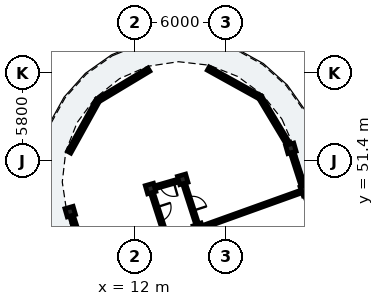
"""IFC4 building model, lengths in metres.
Left out: names, types, materials, properties, quantities, classifications, styles, units other than length and angle.
Written with IfcOpenShell. Run it as: python <this file> out.ifc"""

import sys

from ifc_helpers import new_model, si_unit, direction, frame, frame_2d, origin, origin_2d, place, context, subcontext, project, spatial, rectangle, extrude, element, fill, save


model = new_model("IFC4")
c1 = context("Model", 3, precision=1e-05, world=origin(), true_north=direction((0.0, 1.0)))
c2 = subcontext(c1, "Body", "Model", "MODEL_VIEW")
j1 = project(units=[si_unit("LENGTHUNIT", "METRE"), si_unit("PLANEANGLEUNIT", "RADIAN")], contexts=[c1])
p1 = place(None, origin())
s1 = spatial("IfcSite", under=j1, at=p1, CompositionType="ELEMENT")
p2 = place(p1, origin())
s2 = spatial("IfcBuilding", under=s1, at=p2, CompositionType="ELEMENT")
p3 = place(p2, frame((0.0, 0.0, 15.56)))
s3 = spatial("IfcBuildingStorey", under=s2, at=p3, CompositionType="ELEMENT", Elevation=15.56)
for number, where, z_axis, x_axis in (
    (1, (22.272, 52.248, 0.0), (0.0, 0.0, 1.0), (-0.961, -0.276, 0.0)),
    (2, (15.159, 50.208, 0.0), (0.0, 0.0, 1.0), (-0.961, -0.276, 0.0)),
    (3, (13.044, 49.602, 0.0), (0.0, 0.0, 1.0), (-0.961, -0.276, 0.0)),
    (4, (7.757, 48.086, 0.0), (0.0, 0.0, 1.0), (-0.961, -0.276, 0.0)),
):
    element("IfcColumn", number, at=place(p3, frame(where, z_axis=z_axis, x_axis=x_axis)), inside=s3, PredefinedType="COLUMN", context=c2, shape_type="SweptSolid", body=[
        extrude(rectangle(XDim=0.56, YDim=0.56, at=origin_2d()), origin(), (0.0, 0.0, 1.0), 3.11),
    ])
p4 = place(p3, frame((23.165, 49.479, 0.0), z_axis=(0.0, 0.0, 1.0), x_axis=(-0.941176015256, -0.337916718003, 0.0)))
e5 = element("IfcColumn", 5, at=p4, inside=s3, PredefinedType="PILASTER", context=c2, shape_type="SweptSolid", body=[
    extrude(rectangle(XDim=0.38, YDim=0.62, at=origin_2d()), origin(), (0.0, 0.0, 1.0), 3.11),
])
p5 = place(p3, frame((16.2, 46.979, 0.0), z_axis=(0.0, 0.0, 1.0), x_axis=(-0.941176015256, -0.337916718003, 0.0)))
e6 = element("IfcColumn", 6, at=p5, inside=s3, PredefinedType="COLUMN", context=c2, shape_type="SweptSolid", body=[
    extrude(rectangle(XDim=0.56, YDim=0.56, at=origin_2d()), origin(), (0.0, 0.0, 1.0), 3.11),
])
p6 = place(p3, frame((7.833, 47.848, 0.0), z_axis=(0.0, 0.0, 1.0), x_axis=(0.306949591136, -0.951725773793, 0.0)))
e7 = element("IfcWall", 7, at=p6, inside=s3, PredefinedType="SOLIDWALL", context=c2, shape_type="SweptSolid", body=[
    extrude(rectangle(XDim=3.487, YDim=0.245, at=frame_2d((1.743, 0.0))), origin(), (0.0, 0.0, 1.0), 2.355),
])
p7 = place(p6, frame((1.203, 0.0, 0.55)))
e8 = element("IfcOpeningElement", 8, at=p7, cuts=e7, PredefinedType="OPENING", context=c2, shape_type="SweptSolid", body=[
    extrude(rectangle(XDim=1.08, YDim=1.45, at=frame_2d((0.54, 0.725))), frame((0.0, 0.133, 0.0), z_axis=(0.0, -1.0, 0.0), x_axis=(1.0, 0.0, 0.0)), (0.0, 0.0, 1.0), 0.265),
])
p8 = place(p3, frame((22.349, 52.01, 0.0), z_axis=(0.0, 0.0, 1.0), x_axis=(0.306979942778, -0.951715984279, 0.0)))
e9 = element("IfcWall", 9, at=p8, inside=s3, PredefinedType="SOLIDWALL", context=c2, shape_type="SweptSolid", body=[
    extrude(rectangle(XDim=2.499, YDim=0.245, at=frame_2d((1.25, 0.0))), origin(), (0.0, 0.0, 1.0), 2.355),
])
p9 = place(p8, frame((0.649, 0.0, 0.55)))
e10 = element("IfcOpeningElement", 10, at=p9, cuts=e9, PredefinedType="OPENING", context=c2, shape_type="SweptSolid", body=[
    extrude(rectangle(XDim=1.2, YDim=1.51, at=frame_2d((0.6, 0.755))), frame((0.0, 0.133, 0.0), z_axis=(0.0, -1.0, 0.0), x_axis=(1.0, 0.0, 0.0)), (0.0, 0.0, 1.0), 0.265),
])
p10 = place(p3, frame((23.224, 49.331, 0.0), z_axis=(0.0, 0.0, 1.0), x_axis=(0.368558756085, -0.9296044553, 0.0)))
e11 = element("IfcWall", 11, at=p10, inside=s3, PredefinedType="SOLIDWALL", context=c2, shape_type="SweptSolid", body=[
    extrude(rectangle(XDim=2.499, YDim=0.245, at=frame_2d((1.249, 0.0))), origin(), (0.0, 0.0, 1.0), 2.355),
])
p11 = place(p10, frame((0.589, 0.0, 0.55)))
e12 = element("IfcOpeningElement", 12, at=p11, cuts=e11, PredefinedType="OPENING", context=c2, shape_type="SweptSolid", body=[
    extrude(rectangle(XDim=1.32, YDim=1.585, at=frame_2d((0.66, 0.792))), frame((0.0, 0.133, 0.0), z_axis=(0.0, -1.0, 0.0), x_axis=(1.0, 0.0, 0.0)), (0.0, 0.0, 1.0), 0.265),
])
p12 = place(p3, frame((7.689, 51.993, 0.0), z_axis=(0.0, 0.0, 1.0), x_axis=(0.48481530532, 0.874616555828, 0.0)))
e13 = element("IfcWall", 13, at=p12, inside=s3, PredefinedType="SOLIDWALL", context=c2, shape_type="SweptSolid", body=[
    extrude(rectangle(XDim=3.908, YDim=0.245, at=frame_2d((1.954, 0.0))), origin(), (0.0, 0.0, 1.0), 2.355),
])
p13 = place(p12, frame((1.029, 0.0, 0.4)))
e14 = element("IfcOpeningElement", 14, at=p13, cuts=e13, PredefinedType="OPENING", context=c2, shape_type="SweptSolid", body=[
    extrude(rectangle(XDim=1.85, YDim=1.72, at=frame_2d((0.925, 0.86))), frame((0.0, 0.133, 0.0), z_axis=(0.0, -1.0, 0.0), x_axis=(1.0, 0.0, 0.0)), (0.0, 0.0, 1.0), 0.265),
])
p14 = place(p3, frame((9.583, 55.412, 0.0), z_axis=(0.0, 0.0, 1.0), x_axis=(0.857178568309, 0.515019321998, 0.0)))
e15 = element("IfcWall", 15, at=p14, inside=s3, PredefinedType="SOLIDWALL", context=c2, shape_type="SweptSolid", body=[
    extrude(rectangle(XDim=3.908, YDim=0.245, at=frame_2d((1.954, 0.0))), origin(), (0.0, 0.0, 1.0), 2.355),
])
p15 = place(p14, frame((0.979, 0.0, 0.4)))
e16 = element("IfcOpeningElement", 16, at=p15, cuts=e15, PredefinedType="OPENING", context=c2, shape_type="SweptSolid", body=[
    extrude(rectangle(XDim=1.95, YDim=1.78, at=frame_2d((0.975, 0.89))), frame((0.0, 0.133, 0.0), z_axis=(0.0, -1.0, 0.0), x_axis=(1.0, 0.0, 0.0)), (0.0, 0.0, 1.0), 0.265),
])
p16 = place(p3, frame((16.841, 57.493, 0.0), z_axis=(0.0, 0.0, 1.0), x_axis=(0.874616555828, -0.48481530532, 0.0)))
e17 = element("IfcWall", 17, at=p16, inside=s3, PredefinedType="SOLIDWALL", context=c2, shape_type="SweptSolid", body=[
    extrude(rectangle(XDim=3.908, YDim=0.245, at=frame_2d((1.954, 0.0))), origin(), (0.0, 0.0, 1.0), 2.355),
])
p17 = place(p16, frame((1.029, 0.0, 0.4)))
e18 = element("IfcOpeningElement", 18, at=p17, cuts=e17, PredefinedType="OPENING", context=c2, shape_type="SweptSolid", body=[
    extrude(rectangle(XDim=1.85, YDim=1.72, at=frame_2d((0.925, 0.86))), frame((0.0, 0.133, 0.0), z_axis=(0.0, -1.0, 0.0), x_axis=(1.0, 0.0, 0.0)), (0.0, 0.0, 1.0), 0.265),
])
p18 = place(p3, frame((20.259, 55.598, 0.0), z_axis=(0.0, 0.0, 1.0), x_axis=(0.515037642827, -0.857167560324, 0.0)))
e19 = element("IfcWall", 19, at=p18, inside=s3, PredefinedType="SOLIDWALL", context=c2, shape_type="SweptSolid", body=[
    extrude(rectangle(XDim=3.908, YDim=0.245, at=frame_2d((1.954, 0.0))), origin(), (0.0, 0.0, 1.0), 2.355),
])
p19 = place(p18, frame((0.979, 0.0, 0.4)))
e20 = element("IfcOpeningElement", 20, at=p19, cuts=e19, PredefinedType="OPENING", context=c2, shape_type="SweptSolid", body=[
    extrude(rectangle(XDim=1.95, YDim=1.78, at=frame_2d((0.975, 0.89))), frame((0.0, 0.133, 0.0), z_axis=(0.0, -1.0, 0.0), x_axis=(1.0, 0.0, 0.0)), (0.0, 0.0, 1.0), 0.265),
])
p20 = place(p3, frame((13.151, 49.269, 0.0), z_axis=(0.0, 0.0, 1.0), x_axis=(0.30694495224, -0.951727269912, 0.0)))
e21 = element("IfcWall", 21, at=p20, inside=s3, PredefinedType="PARTITIONING", context=c2, shape_type="SweptSolid", body=[
    extrude(rectangle(XDim=2.837, YDim=0.195, at=frame_2d((1.418, 0.0))), origin(), (0.0, 0.0, 1.0), 2.37),
])
p21 = place(p20, frame((0.944, 0.0, 0.0)))
e22 = element("IfcOpeningElement", 22, at=p21, cuts=e21, PredefinedType="OPENING", context=c2, shape_type="SweptSolid", body=[
    extrude(rectangle(XDim=0.95, YDim=2.13, at=frame_2d((0.475, 1.065))), frame((0.0, 0.107, 0.0), z_axis=(0.0, -1.0, 0.0), x_axis=(1.0, 0.0, 0.0)), (0.0, 0.0, 1.0), 0.215),
])
p22 = place(p3, frame((15.266, 49.875, 0.0), z_axis=(0.0, 0.0, 1.0), x_axis=(0.306883578189, -0.951747061691, 0.0)))
e23 = element("IfcWall", 23, at=p22, inside=s3, PredefinedType="PARTITIONING", context=c2, shape_type="SweptSolid", body=[
    extrude(rectangle(XDim=2.693, YDim=0.195, at=frame_2d((1.346, 0.0))), origin(), (0.0, 0.0, 1.0), 2.37),
])
p23 = place(p22, frame((0.872, 0.0, 0.0)))
e24 = element("IfcOpeningElement", 24, at=p23, cuts=e23, PredefinedType="OPENING", context=c2, shape_type="SweptSolid", body=[
    extrude(rectangle(XDim=0.95, YDim=2.13, at=frame_2d((0.475, 1.065))), frame((0.0, 0.107, 0.0), z_axis=(0.0, -1.0, 0.0), x_axis=(1.0, 0.0, 0.0)), (0.0, 0.0, 1.0), 0.215),
])
p24 = place(p3, frame((22.788, 49.344, 0.0), z_axis=(0.0, 0.0, 1.0), x_axis=(-0.941179890997, -0.337905922978, 0.0)))
e25 = element("IfcWall", 25, at=p24, inside=s3, PredefinedType="PARTITIONING", context=c2, shape_type="SweptSolid", body=[
    extrude(rectangle(XDim=6.6, YDim=0.185, at=frame_2d((3.3, 0.0))), origin(), (0.0, 0.0, 1.0), 2.37),
])
p25 = place(p3, frame((15.111, 50.194, 0.0), z_axis=(0.0, 0.0, 1.0), x_axis=(-0.961264701934, -0.275626872449, 0.0)))
e26 = element("IfcWall", 26, at=p25, inside=s3, PredefinedType="PARTITIONING", context=c2, shape_type="SweptSolid", body=[
    extrude(rectangle(XDim=2.1, YDim=0.195, at=frame_2d((1.05, 0.0))), origin(), (0.0, 0.0, 1.0), 2.37),
])
p26 = place(p25, frame((0.57, 0.0, 0.0)))
e27 = element("IfcOpeningElement", 27, at=p26, cuts=e26, PredefinedType="OPENING", context=c2, shape_type="SweptSolid", body=[
    extrude(rectangle(XDim=0.95, YDim=2.13, at=frame_2d((0.475, 1.065))), frame((0.0, 0.107, 0.0), z_axis=(0.0, -1.0, 0.0), x_axis=(1.0, 0.0, 0.0)), (0.0, 0.0, 1.0), 0.215),
])
p27 = place(p9, origin())
e28 = element("IfcWindow", 28, at=p27, inside=s3, PartitioningType="SINGLE_PANEL", PredefinedType="WINDOW", context=c2, shape_type="SweptSolid", body=[
    extrude(rectangle(XDim=1.2, YDim=1.51, at=frame_2d((0.6, 0.755))), frame((0.0, 0.03, 0.0), z_axis=(0.0, -1.0, 0.0), x_axis=(1.0, 0.0, 0.0)), (0.0, 0.0, 1.0), 0.06),
])
fill(e10, e28)
p28 = place(p13, origin())
e29 = element("IfcWindow", 29, at=p28, inside=s3, PartitioningType="SINGLE_PANEL", PredefinedType="WINDOW", context=c2, shape_type="SweptSolid", body=[
    extrude(rectangle(XDim=1.85, YDim=1.72, at=frame_2d((0.925, 0.86))), frame((0.0, 0.03, 0.0), z_axis=(0.0, -1.0, 0.0), x_axis=(1.0, 0.0, 0.0)), (0.0, 0.0, 1.0), 0.06),
])
fill(e14, e29)
p29 = place(p15, origin())
e30 = element("IfcWindow", 30, at=p29, inside=s3, PartitioningType="SINGLE_PANEL", PredefinedType="WINDOW", context=c2, shape_type="SweptSolid", body=[
    extrude(rectangle(XDim=1.95, YDim=1.78, at=frame_2d((0.975, 0.89))), frame((0.0, 0.03, 0.0), z_axis=(0.0, -1.0, 0.0), x_axis=(1.0, 0.0, 0.0)), (0.0, 0.0, 1.0), 0.06),
])
fill(e16, e30)
p30 = place(p17, origin())
e31 = element("IfcWindow", 31, at=p30, inside=s3, PartitioningType="SINGLE_PANEL", PredefinedType="WINDOW", context=c2, shape_type="SweptSolid", body=[
    extrude(rectangle(XDim=1.85, YDim=1.72, at=frame_2d((0.925, 0.86))), frame((0.0, 0.03, 0.0), z_axis=(0.0, -1.0, 0.0), x_axis=(1.0, 0.0, 0.0)), (0.0, 0.0, 1.0), 0.06),
])
fill(e18, e31)
p31 = place(p19, origin())
e32 = element("IfcWindow", 32, at=p31, inside=s3, PartitioningType="SINGLE_PANEL", PredefinedType="WINDOW", context=c2, shape_type="SweptSolid", body=[
    extrude(rectangle(XDim=1.95, YDim=1.78, at=frame_2d((0.975, 0.89))), frame((0.0, 0.03, 0.0), z_axis=(0.0, -1.0, 0.0), x_axis=(1.0, 0.0, 0.0)), (0.0, 0.0, 1.0), 0.06),
])
fill(e20, e32)
p32 = place(p21, origin())
e33 = element("IfcDoor", 33, at=p32, inside=s3, OperationType="SINGLE_SWING_LEFT", PredefinedType="DOOR", context=c2, shape_type="SweptSolid", body=[
    extrude(rectangle(XDim=0.95, YDim=2.13, at=frame_2d((0.475, 1.065))), frame((0.0, 0.025, 0.0), z_axis=(0.0, -1.0, 0.0), x_axis=(1.0, 0.0, 0.0)), (0.0, 0.0, 1.0), 0.05),
])
fill(e22, e33)
p33 = place(p23, origin())
e34 = element("IfcDoor", 34, at=p33, inside=s3, OperationType="SINGLE_SWING_RIGHT", PredefinedType="DOOR", context=c2, shape_type="SweptSolid", body=[
    extrude(rectangle(XDim=0.95, YDim=2.13, at=frame_2d((0.475, 1.065))), frame((0.0, 0.025, 0.0), z_axis=(0.0, -1.0, 0.0), x_axis=(1.0, 0.0, 0.0)), (0.0, 0.0, 1.0), 0.05),
])
fill(e24, e34)
p34 = place(p26, origin())
e35 = element("IfcDoor", 35, at=p34, inside=s3, OperationType="SINGLE_SWING_LEFT", PredefinedType="DOOR", context=c2, shape_type="SweptSolid", body=[
    extrude(rectangle(XDim=0.95, YDim=2.13, at=frame_2d((0.475, 1.065))), frame((0.0, 0.025, 0.0), z_axis=(0.0, -1.0, 0.0), x_axis=(1.0, 0.0, 0.0)), (0.0, 0.0, 1.0), 0.05),
])
fill(e27, e35)
save(model, sys.argv[1])
